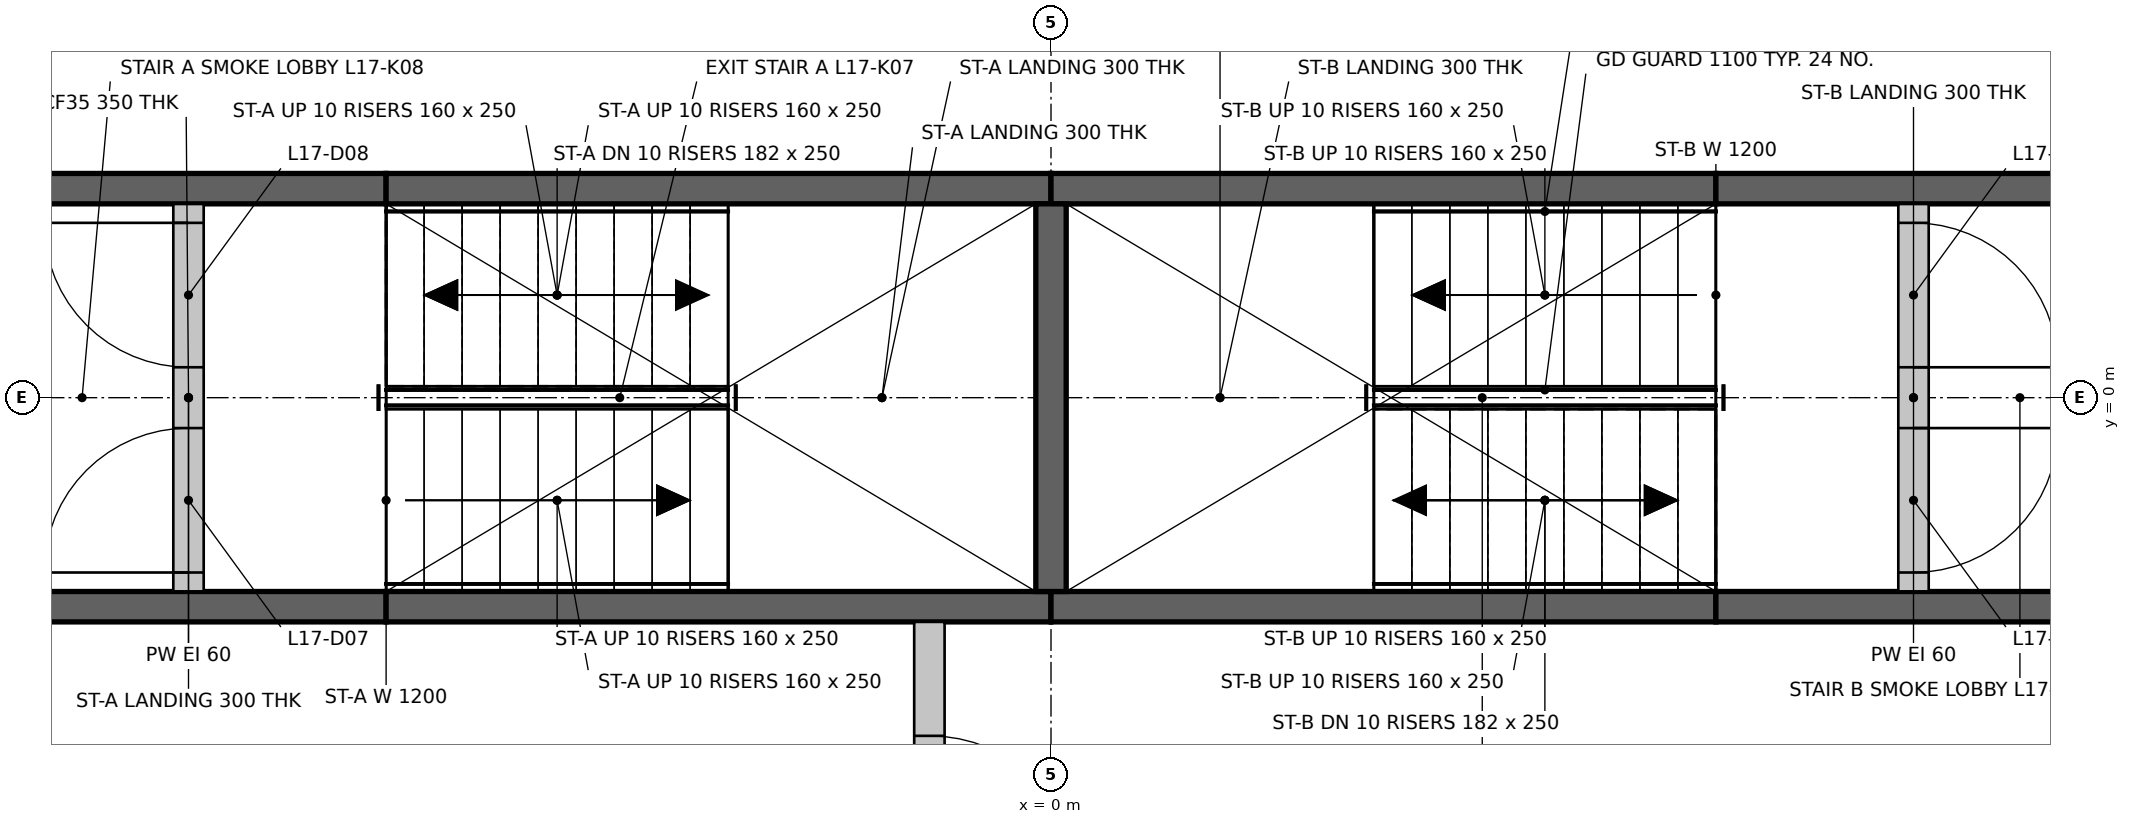
"""IFC4 building model, lengths in metres.
Left out: names, types, materials, properties, quantities, classifications, styles, units other than length and angle.
Written with IfcOpenShell. Run it as: python <this file> out.ifc"""

import sys

from ifc_helpers import new_model, si_unit, direction, frame, frame_2d, origin, place, context, subcontext, project, spatial, rectangle, extrude, element, fill, save


model = new_model("IFC4")
c1 = context("Model", 3, precision=1e-05, world=origin(), true_north=direction((0.0, 1.0)))
c2 = subcontext(c1, "Body", "Model", "MODEL_VIEW")
j1 = project(units=[si_unit("LENGTHUNIT", "METRE"), si_unit("PLANEANGLEUNIT", "RADIAN")], contexts=[c1])
p1 = place(None, origin())
s1 = spatial("IfcSite", under=j1, at=p1, CompositionType="ELEMENT")
p2 = place(p1, origin())
s2 = spatial("IfcBuilding", under=s1, at=p2, CompositionType="ELEMENT")
p3 = place(p2, frame((0.0, 0.0, 66.35)))
s3 = spatial("IfcBuildingStorey", under=s2, at=p3, CompositionType="ELEMENT", Elevation=66.35)
p4 = place(p3, frame((-6.974, -1.375, 0.0), z_axis=(0.0, 0.0, 1.0), x_axis=(1.0, 0.0, 0.0)))
e1 = element("IfcWall", 1, at=p4, inside=s3, PredefinedType="SHEAR", context=c2, shape_type="SweptSolid", body=[
    extrude(rectangle(XDim=2.6, YDim=0.2, at=frame_2d((1.3, 0.0))), origin(), (0.0, 0.0, 1.0), 6.05),
])
for number, where, z_axis, x_axis in (
    (2, (-4.374, -1.375, 0.0), (0.0, 0.0, 1.0), (1.0, 0.0, 0.0)),
    (3, (0.0, -1.375, 0.0), (0.0, 0.0, 1.0), (1.0, 0.0, 0.0)),
):
    element("IfcWall", number, at=place(p3, frame(where, z_axis=z_axis, x_axis=x_axis)), inside=s3, PredefinedType="SHEAR", context=c2, shape_type="SweptSolid", body=[
        extrude(rectangle(XDim=4.374, YDim=0.2, at=frame_2d((2.187, 0.0))), origin(), (0.0, 0.0, 1.0), 6.05),
    ])
for number, where, z_axis, x_axis in (
    (4, (4.374, -1.375, 0.0), (0.0, 0.0, 1.0), (1.0, 0.0, 0.0)),
    (5, (-6.974, 1.375, 0.0), (0.0, 0.0, 1.0), (1.0, 0.0, 0.0)),
):
    element("IfcWall", number, at=place(p3, frame(where, z_axis=z_axis, x_axis=x_axis)), inside=s3, PredefinedType="SHEAR", context=c2, shape_type="SweptSolid", body=[
        extrude(rectangle(XDim=2.6, YDim=0.2, at=frame_2d((1.3, 0.0))), origin(), (0.0, 0.0, 1.0), 6.05),
    ])
for number, where, z_axis, x_axis in (
    (6, (-4.374, 1.375, 0.0), (0.0, 0.0, 1.0), (1.0, 0.0, 0.0)),
    (7, (0.0, 1.375, 0.0), (0.0, 0.0, 1.0), (1.0, 0.0, 0.0)),
):
    element("IfcWall", number, at=place(p3, frame(where, z_axis=z_axis, x_axis=x_axis)), inside=s3, PredefinedType="SHEAR", context=c2, shape_type="SweptSolid", body=[
        extrude(rectangle(XDim=4.374, YDim=0.2, at=frame_2d((2.187, 0.0))), origin(), (0.0, 0.0, 1.0), 6.05),
    ])
p5 = place(p3, frame((4.374, 1.375, 0.0), z_axis=(0.0, 0.0, 1.0), x_axis=(1.0, 0.0, 0.0)))
e8 = element("IfcWall", 8, at=p5, inside=s3, PredefinedType="SHEAR", context=c2, shape_type="SweptSolid", body=[
    extrude(rectangle(XDim=2.6, YDim=0.2, at=frame_2d((1.3, 0.0))), origin(), (0.0, 0.0, 1.0), 6.05),
])
p6 = place(p3, frame((0.0, -1.275, 0.0), z_axis=(0.0, 0.0, 1.0), x_axis=(0.0, 1.0, 0.0)))
e9 = element("IfcWall", 9, at=p6, inside=s3, PredefinedType="SHEAR", context=c2, shape_type="SweptSolid", body=[
    extrude(rectangle(XDim=2.55, YDim=0.2, at=frame_2d((1.275, 0.0))), origin(), (0.0, 0.0, 1.0), 6.05),
])
p7 = place(p3, frame((-0.8, -3.974, 0.0), z_axis=(0.0, 0.0, 1.0), x_axis=(0.0, 1.0, 0.0)))
e10 = element("IfcWall", 10, at=p7, inside=s3, PredefinedType="PARTITIONING", context=c2, shape_type="SweptSolid", body=[
    extrude(rectangle(XDim=2.499, YDim=0.2, at=frame_2d((1.25, 0.0))), origin(), (0.0, 0.0, 1.0), 6.05),
])
p8 = place(p7, frame((0.75, 0.0, 0.0)))
e11 = element("IfcOpeningElement", 11, at=p8, cuts=e10, PredefinedType="OPENING", context=c2, shape_type="SweptSolid", body=[
    extrude(rectangle(XDim=1.0, YDim=2.1, at=frame_2d((0.5, 1.05))), frame((0.0, 0.11, 0.0), z_axis=(0.0, -1.0, 0.0), x_axis=(1.0, 0.0, 0.0)), (0.0, 0.0, 1.0), 0.22),
])
p9 = place(p3, frame((-5.674, -1.275, 0.0), z_axis=(0.0, 0.0, 1.0), x_axis=(0.0, 1.0, 0.0)))
e12 = element("IfcWall", 12, at=p9, inside=s3, PredefinedType="PARTITIONING", context=c2, shape_type="SweptSolid", body=[
    extrude(rectangle(XDim=2.55, YDim=0.2, at=frame_2d((1.275, 0.0))), origin(), (0.0, 0.0, 1.0), 6.05),
])
p10 = place(p9, frame((0.125, 0.0, 0.0)))
e13 = element("IfcOpeningElement", 13, at=p10, cuts=e12, PredefinedType="OPENING", context=c2, shape_type="SweptSolid", body=[
    extrude(rectangle(XDim=0.95, YDim=2.1, at=frame_2d((0.475, 1.05))), frame((0.0, 0.11, 0.0), z_axis=(0.0, -1.0, 0.0), x_axis=(1.0, 0.0, 0.0)), (0.0, 0.0, 1.0), 0.22),
])
p11 = place(p9, frame((1.475, 0.0, 0.0)))
e14 = element("IfcOpeningElement", 14, at=p11, cuts=e12, PredefinedType="OPENING", context=c2, shape_type="SweptSolid", body=[
    extrude(rectangle(XDim=0.95, YDim=2.1, at=frame_2d((0.475, 1.05))), frame((0.0, 0.11, 0.0), z_axis=(0.0, -1.0, 0.0), x_axis=(1.0, 0.0, 0.0)), (0.0, 0.0, 1.0), 0.22),
])
p12 = place(p3, frame((5.674, -1.275, 0.0), z_axis=(0.0, 0.0, 1.0), x_axis=(0.0, 1.0, 0.0)))
e15 = element("IfcWall", 15, at=p12, inside=s3, PredefinedType="PARTITIONING", context=c2, shape_type="SweptSolid", body=[
    extrude(rectangle(XDim=2.55, YDim=0.2, at=frame_2d((1.275, 0.0))), origin(), (0.0, 0.0, 1.0), 6.05),
])
p13 = place(p12, frame((0.125, 0.0, 0.0)))
e16 = element("IfcOpeningElement", 16, at=p13, cuts=e15, PredefinedType="OPENING", context=c2, shape_type="SweptSolid", body=[
    extrude(rectangle(XDim=0.95, YDim=2.1, at=frame_2d((0.475, 1.05))), frame((0.0, 0.11, 0.0), z_axis=(0.0, -1.0, 0.0), x_axis=(1.0, 0.0, 0.0)), (0.0, 0.0, 1.0), 0.22),
])
p14 = place(p12, frame((1.475, 0.0, 0.0)))
e17 = element("IfcOpeningElement", 17, at=p14, cuts=e15, PredefinedType="OPENING", context=c2, shape_type="SweptSolid", body=[
    extrude(rectangle(XDim=0.95, YDim=2.1, at=frame_2d((0.475, 1.05))), frame((0.0, 0.11, 0.0), z_axis=(0.0, -1.0, 0.0), x_axis=(1.0, 0.0, 0.0)), (0.0, 0.0, 1.0), 0.22),
])
p15 = place(p10, origin())
e18 = element("IfcDoor", 18, at=p15, inside=s3, OperationType="SINGLE_SWING_LEFT", PredefinedType="DOOR", context=c2, shape_type="SweptSolid", body=[
    extrude(rectangle(XDim=0.95, YDim=2.1, at=frame_2d((0.475, 1.05))), frame((0.0, 0.025, 0.0), z_axis=(0.0, -1.0, 0.0), x_axis=(1.0, 0.0, 0.0)), (0.0, 0.0, 1.0), 0.05),
])
fill(e13, e18)
p16 = place(p11, origin())
e19 = element("IfcDoor", 19, at=p16, inside=s3, OperationType="SINGLE_SWING_RIGHT", PredefinedType="DOOR", context=c2, shape_type="SweptSolid", body=[
    extrude(rectangle(XDim=0.95, YDim=2.1, at=frame_2d((0.475, 1.05))), frame((0.0, 0.025, 0.0), z_axis=(0.0, -1.0, 0.0), x_axis=(1.0, 0.0, 0.0)), (0.0, 0.0, 1.0), 0.05),
])
fill(e14, e19)
p17 = place(p13, frame((0.95, 0.0, 0.0), z_axis=(0.0, 0.0, 1.0), x_axis=(-1.0, 0.0, 0.0)))
e20 = element("IfcDoor", 20, at=p17, inside=s3, OperationType="SINGLE_SWING_RIGHT", PredefinedType="DOOR", context=c2, shape_type="SweptSolid", body=[
    extrude(rectangle(XDim=0.95, YDim=2.1, at=frame_2d((0.475, 1.05))), frame((0.0, 0.025, 0.0), z_axis=(0.0, -1.0, 0.0), x_axis=(1.0, 0.0, 0.0)), (0.0, 0.0, 1.0), 0.05),
])
fill(e16, e20)
p18 = place(p14, frame((0.95, 0.0, 0.0), z_axis=(0.0, 0.0, 1.0), x_axis=(-1.0, 0.0, 0.0)))
e21 = element("IfcDoor", 21, at=p18, inside=s3, OperationType="SINGLE_SWING_LEFT", PredefinedType="DOOR", context=c2, shape_type="SweptSolid", body=[
    extrude(rectangle(XDim=0.95, YDim=2.1, at=frame_2d((0.475, 1.05))), frame((0.0, 0.025, 0.0), z_axis=(0.0, -1.0, 0.0), x_axis=(1.0, 0.0, 0.0)), (0.0, 0.0, 1.0), 0.05),
])
fill(e17, e21)
p19 = place(p8, frame((1.0, 0.0, 0.0), z_axis=(0.0, 0.0, 1.0), x_axis=(-1.0, 0.0, 0.0)))
e22 = element("IfcDoor", 22, at=p19, inside=s3, OperationType="SINGLE_SWING_LEFT", PredefinedType="DOOR", context=c2, shape_type="SweptSolid", body=[
    extrude(rectangle(XDim=1.0, YDim=2.1, at=frame_2d((0.5, 1.05))), frame((0.0, 0.025, 0.0), z_axis=(0.0, -1.0, 0.0), x_axis=(1.0, 0.0, 0.0)), (0.0, 0.0, 1.0), 0.05),
])
fill(e11, e22)
save(model, sys.argv[1])
